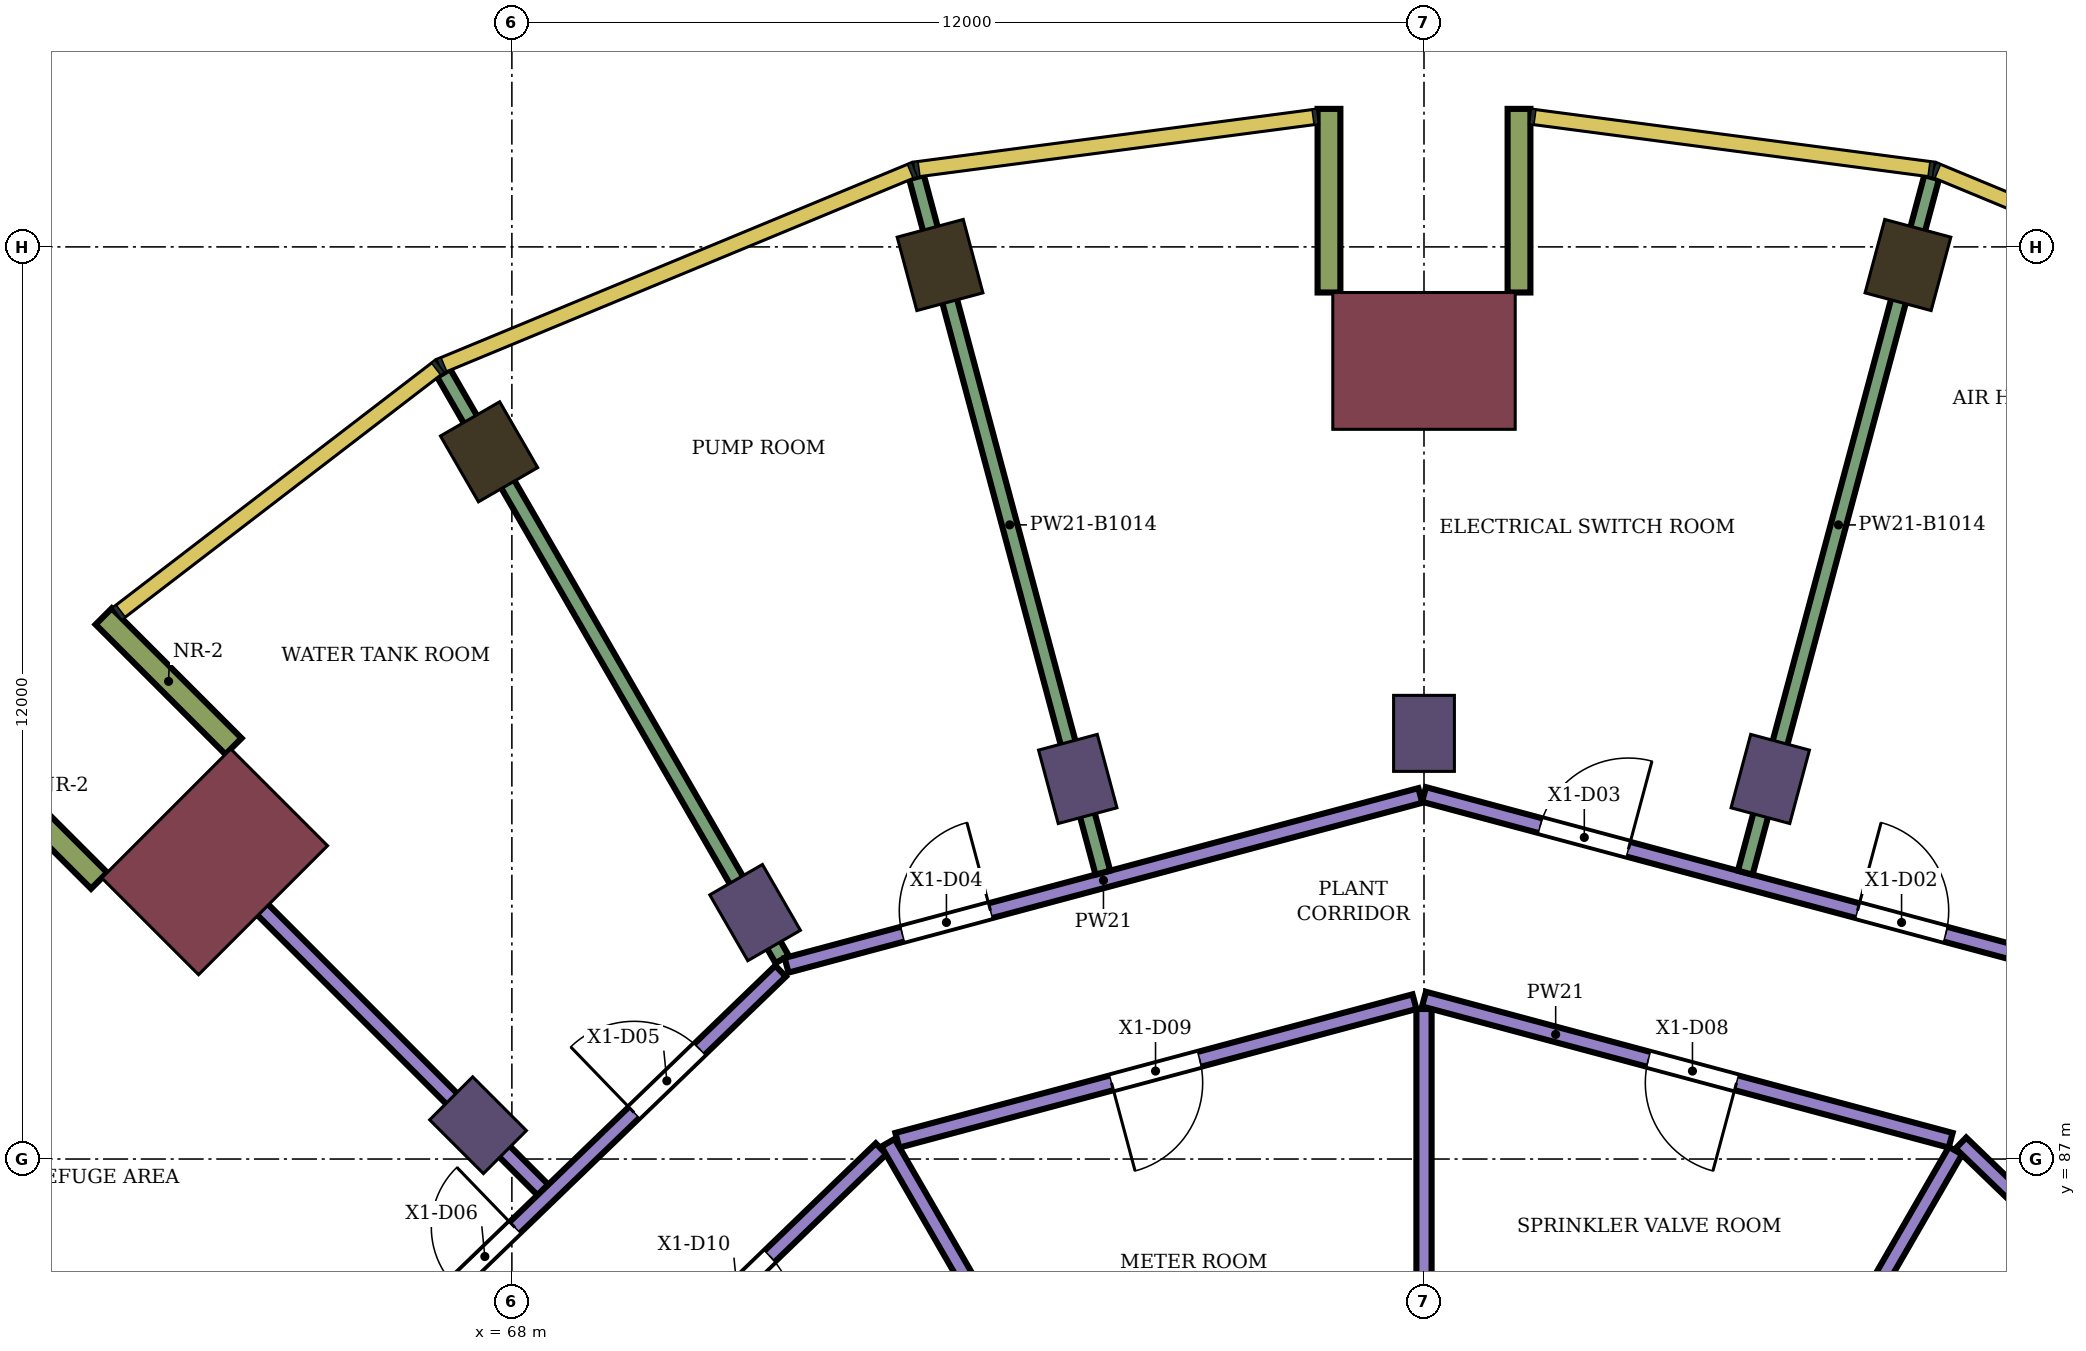
"""IFC4 building model, lengths in metres.
Left out: names, types, materials, properties, quantities, classifications, styles, units other than length and angle.
Written with IfcOpenShell. Run it as: python <this file> out.ifc"""

import sys

from ifc_helpers import new_model, si_unit, direction, frame, frame_2d, origin, origin_2d, place, context, subcontext, project, spatial, rectangle, extrude, element, fill, save


model = new_model("IFC4")
c1 = context("Model", 3, precision=1e-05, world=origin(), true_north=direction((0.0, 1.0)))
c2 = subcontext(c1, "Body", "Model", "MODEL_VIEW")
j1 = project(units=[si_unit("LENGTHUNIT", "METRE"), si_unit("PLANEANGLEUNIT", "RADIAN")], contexts=[c1])
p1 = place(None, origin())
s1 = spatial("IfcSite", under=j1, at=p1, CompositionType="ELEMENT")
p2 = place(p1, origin())
s2 = spatial("IfcBuilding", under=s1, at=p2, CompositionType="ELEMENT")
p3 = place(p2, frame((0.0, 0.0, 109.0)))
s3 = spatial("IfcBuildingStorey", under=s2, at=p3, CompositionType="ELEMENT", Elevation=109.0)
for number, where, z_axis, x_axis in (
    (1, (86.367, 98.762, 0.0), (0.0, 0.0, 1.0), (0.259, 0.966, 0.0)),
    (2, (73.633, 98.762, 0.0), (0.0, 0.0, 1.0), (-0.259, 0.966, 0.0)),
    (3, (67.7, 96.304, 0.0), (0.0, 0.0, 1.0), (-0.5, 0.866, 0.0)),
):
    element("IfcColumn", number, at=place(p3, frame(where, z_axis=z_axis, x_axis=x_axis)), inside=s3, PredefinedType="COLUMN", context=c2, shape_type="SweptSolid", body=[
        extrude(rectangle(XDim=1.0, YDim=0.9, at=origin_2d()), origin(), (0.0, 0.0, 1.0), 5.6),
    ])
for number, where, z_axis, x_axis in (
    (4, (84.555, 92.0, 0.0), (0.0, 0.0, 1.0), (0.259, 0.966, 0.0)),
    (5, (80.0, 92.6, 0.0), (0.0, 0.0, 1.0), (0.0, 1.0, 0.0)),
    (6, (75.445, 92.0, 0.0), (0.0, 0.0, 1.0), (-0.259, 0.966, 0.0)),
    (7, (71.2, 90.242, 0.0), (0.0, 0.0, 1.0), (-0.5, 0.866, 0.0)),
    (8, (67.555, 87.445, 0.0), (0.0, 0.0, 1.0), (-0.707, 0.707, 0.0)),
):
    element("IfcColumn", number, at=place(p3, frame(where, z_axis=z_axis, x_axis=x_axis)), inside=s3, PredefinedType="COLUMN", context=c2, shape_type="SweptSolid", body=[
        extrude(rectangle(XDim=1.0, YDim=0.8, at=origin_2d()), origin(), (0.0, 0.0, 1.0), 5.6),
    ])
for number, where, z_axis, x_axis in (
    (9, (80.0, 97.5, 0.0), (0.0, 0.0, 1.0), (0.0, 1.0, 0.0)),
    (10, (64.09, 90.91, 0.0), (0.0, 0.0, 1.0), (-0.707, 0.707, 0.0)),
):
    element("IfcColumn", number, at=place(p3, frame(where, z_axis=z_axis, x_axis=x_axis)), inside=s3, PredefinedType="COLUMN", context=c2, shape_type="SweptSolid", body=[
        extrude(rectangle(XDim=1.8, YDim=2.4, at=origin_2d()), origin(), (0.0, 0.0, 1.0), 5.6),
    ])
for number, where, z_axis, x_axis in (
    (11, (81.25, 98.4, 0.0), (0.0, 0.0, 1.0), (0.0, 1.0, 0.0)),
    (12, (78.75, 98.4, 0.0), (0.0, 0.0, 1.0), (0.0, 1.0, 0.0)),
    (13, (64.338, 92.43, 0.0), (0.0, 0.0, 1.0), (-0.707, 0.707, 0.0)),
    (14, (62.57, 90.662, 0.0), (0.0, 0.0, 1.0), (-0.707, 0.707, 0.0)),
):
    element("IfcWall", number, at=place(p3, frame(where, z_axis=z_axis, x_axis=x_axis)), inside=s3, PredefinedType="NOTDEFINED", context=c2, shape_type="SweptSolid", body=[
        extrude(rectangle(XDim=2.416, YDim=0.3, at=frame_2d((1.208, 0.0))), origin(), (0.0, 0.0, 1.0), 5.6),
    ])
p4 = place(p3, frame((63.597, 91.406, 0.0), z_axis=(0.0, 0.0, 1.0), x_axis=(0.707035026478, -0.707178528614, 0.0)))
e15 = element("IfcWall", 15, at=p4, inside=s3, PredefinedType="PARTITIONING", context=c2, shape_type="SweptSolid", body=[
    extrude(rectangle(XDim=6.805, YDim=0.2, at=frame_2d((3.403, 0.0))), origin(), (0.0, 0.0, 1.0), 5.15),
])
p5 = place(p3, frame((66.84, 84.941, 0.0), z_axis=(0.0, 0.0, 1.0), x_axis=(0.719566481028, 0.694423559062, 0.0)))
e16 = element("IfcWall", 16, at=p5, inside=s3, PredefinedType="PARTITIONING", context=c2, shape_type="SweptSolid", body=[
    extrude(rectangle(XDim=6.525, YDim=0.2, at=frame_2d((3.263, 0.0))), origin(), (0.0, 0.0, 1.0), 5.15),
])
p6 = place(p5, frame((3.846, 0.0, 0.0)))
e17 = element("IfcOpeningElement", 17, at=p6, cuts=e16, PredefinedType="OPENING", context=c2, shape_type="SweptSolid", body=[
    extrude(rectangle(XDim=1.2, YDim=2.4, at=frame_2d((0.6, 1.2))), frame((0.0, 0.11, 0.0), z_axis=(0.0, -1.0, 0.0), x_axis=(1.0, 0.0, 0.0)), (0.0, 0.0, 1.0), 0.22),
])
p7 = place(p5, frame((0.568, 0.0, 0.0)))
e18 = element("IfcOpeningElement", 18, at=p7, cuts=e16, PredefinedType="OPENING", context=c2, shape_type="SweptSolid", body=[
    extrude(rectangle(XDim=1.1, YDim=2.1, at=frame_2d((0.55, 1.05))), frame((0.0, 0.11, 0.0), z_axis=(0.0, -1.0, 0.0), x_axis=(1.0, 0.0, 0.0)), (0.0, 0.0, 1.0), 0.22),
])
p8 = place(p3, frame((67.102, 97.342, 0.0), z_axis=(0.0, 0.0, 1.0), x_axis=(0.499997660635, -0.866026754413, 0.0)))
e19 = element("IfcWall", 19, at=p8, inside=s3, PredefinedType="PARTITIONING", context=c2, shape_type="SweptSolid", body=[
    extrude(rectangle(XDim=8.908, YDim=0.2, at=frame_2d((4.454, 0.0))), origin(), (0.0, 0.0, 1.0), 4.586),
])
p9 = place(p3, frame((68.987, 83.4, 0.0), z_axis=(0.0, 0.0, 1.0), x_axis=(0.719547721855, 0.694442996922, 0.0)))
e20 = element("IfcWall", 20, at=p9, inside=s3, PredefinedType="PARTITIONING", context=c2, shape_type="SweptSolid", body=[
    extrude(rectangle(XDim=5.378, YDim=0.2, at=frame_2d((2.689, 0.0))), origin(), (0.0, 0.0, 1.0), 5.15),
])
p10 = place(p9, frame((2.144, 0.0, 0.0)))
e21 = element("IfcOpeningElement", 21, at=p10, cuts=e20, PredefinedType="OPENING", context=c2, shape_type="SweptSolid", body=[
    extrude(rectangle(XDim=1.2, YDim=2.4, at=frame_2d((0.6, 1.2))), frame((0.0, 0.11, 0.0), z_axis=(0.0, -1.0, 0.0), x_axis=(1.0, 0.0, 0.0)), (0.0, 0.0, 1.0), 0.22),
])
p11 = place(p3, frame((71.614, 89.549, 0.0), z_axis=(0.0, 0.0, 1.0), x_axis=(0.965931008246, 0.258799705, 0.0)))
e22 = element("IfcWall", 22, at=p11, inside=s3, PredefinedType="PARTITIONING", context=c2, shape_type="SweptSolid", body=[
    extrude(rectangle(XDim=8.632, YDim=0.2, at=frame_2d((4.316, 0.0))), origin(), (0.0, 0.0, 1.0), 5.15),
])
p12 = place(p11, frame((1.577, 0.0, 0.0)))
e23 = element("IfcOpeningElement", 23, at=p12, cuts=e22, PredefinedType="OPENING", context=c2, shape_type="SweptSolid", body=[
    extrude(rectangle(XDim=1.2, YDim=2.4, at=frame_2d((0.6, 1.2))), frame((0.0, 0.11, 0.0), z_axis=(0.0, -1.0, 0.0), x_axis=(1.0, 0.0, 0.0)), (0.0, 0.0, 1.0), 0.22),
])
p13 = place(p3, frame((73.071, 87.247, 0.0), z_axis=(0.0, 0.0, 1.0), x_axis=(0.965914318977, 0.258861987157, 0.0)))
e24 = element("IfcWall", 24, at=p13, inside=s3, PredefinedType="PARTITIONING", context=c2, shape_type="SweptSolid", body=[
    extrude(rectangle(XDim=7.043, YDim=0.2, at=frame_2d((3.521, 0.0))), origin(), (0.0, 0.0, 1.0), 5.15),
])
p14 = place(p13, frame((2.917, 0.0, 0.0)))
e25 = element("IfcOpeningElement", 25, at=p14, cuts=e24, PredefinedType="OPENING", context=c2, shape_type="SweptSolid", body=[
    extrude(rectangle(XDim=1.2, YDim=2.4, at=frame_2d((0.6, 1.2))), frame((0.0, 0.11, 0.0), z_axis=(0.0, -1.0, 0.0), x_axis=(1.0, 0.0, 0.0)), (0.0, 0.0, 1.0), 0.22),
])
p15 = place(p3, frame((72.948, 87.214, 0.0), z_axis=(0.0, 0.0, 1.0), x_axis=(0.500000701339, -0.866024998866, 0.0)))
e26 = element("IfcWall", 26, at=p15, inside=s3, PredefinedType="PARTITIONING", context=c2, shape_type="SweptSolid", body=[
    extrude(rectangle(XDim=6.405, YDim=0.2, at=frame_2d((3.203, 0.0))), origin(), (0.0, 0.0, 1.0), 5.15),
])
p16 = place(p3, frame((73.323, 99.918, 0.0), z_axis=(0.0, 0.0, 1.0), x_axis=(0.258818956582, -0.965925850008, 0.0)))
e27 = element("IfcWall", 27, at=p16, inside=s3, PredefinedType="PARTITIONING", context=c2, shape_type="SweptSolid", body=[
    extrude(rectangle(XDim=9.473, YDim=0.2, at=frame_2d((4.737, 0.0))), origin(), (0.0, 0.0, 1.0), 4.586),
])
p17 = place(p3, frame((80.0, 82.699, 0.0), z_axis=(0.0, 0.0, 1.0), x_axis=(0.0, 1.0, 0.0)))
e28 = element("IfcWall", 28, at=p17, inside=s3, PredefinedType="PARTITIONING", context=c2, shape_type="SweptSolid", body=[
    extrude(rectangle(XDim=6.275, YDim=0.2, at=frame_2d((3.138, 0.0))), origin(), (0.0, 0.0, 1.0), 5.15),
])
p18 = place(p3, frame((80.0, 89.104, 0.0), z_axis=(0.0, 0.0, 1.0), x_axis=(0.965912194639, -0.258869913757, 0.0)))
e29 = element("IfcWall", 29, at=p18, inside=s3, PredefinedType="PARTITIONING", context=c2, shape_type="SweptSolid", body=[
    extrude(rectangle(XDim=7.173, YDim=0.2, at=frame_2d((3.587, 0.0))), origin(), (0.0, 0.0, 1.0), 5.15),
])
p19 = place(p18, frame((3.057, 0.0, 0.0)))
e30 = element("IfcOpeningElement", 30, at=p19, cuts=e29, PredefinedType="OPENING", context=c2, shape_type="SweptSolid", body=[
    extrude(rectangle(XDim=1.2, YDim=2.4, at=frame_2d((0.6, 1.2))), frame((0.0, 0.11, 0.0), z_axis=(0.0, -1.0, 0.0), x_axis=(1.0, 0.0, 0.0)), (0.0, 0.0, 1.0), 0.22),
])
p20 = place(p3, frame((80.0, 91.796, 0.0), z_axis=(0.0, 0.0, 1.0), x_axis=(0.965917643923, -0.258849580177, 0.0)))
e31 = element("IfcWall", 31, at=p20, inside=s3, PredefinedType="PARTITIONING", context=c2, shape_type="SweptSolid", body=[
    extrude(rectangle(XDim=8.602, YDim=0.2, at=frame_2d((4.301, 0.0))), origin(), (0.0, 0.0, 1.0), 5.15),
])
p21 = place(p20, frame((5.905, 0.0, 0.0)))
e32 = element("IfcOpeningElement", 32, at=p21, cuts=e31, PredefinedType="OPENING", context=c2, shape_type="SweptSolid", body=[
    extrude(rectangle(XDim=1.2, YDim=2.4, at=frame_2d((0.6, 1.2))), frame((0.0, 0.11, 0.0), z_axis=(0.0, -1.0, 0.0), x_axis=(1.0, 0.0, 0.0)), (0.0, 0.0, 1.0), 0.22),
])
p22 = place(p20, frame((1.583, 0.0, 0.0)))
e33 = element("IfcOpeningElement", 33, at=p22, cuts=e31, PredefinedType="OPENING", context=c2, shape_type="SweptSolid", body=[
    extrude(rectangle(XDim=1.2, YDim=2.4, at=frame_2d((0.6, 1.2))), frame((0.0, 0.11, 0.0), z_axis=(0.0, -1.0, 0.0), x_axis=(1.0, 0.0, 0.0)), (0.0, 0.0, 1.0), 0.22),
])
p23 = place(p3, frame((83.849, 81.667, 0.0), z_axis=(0.0, 0.0, 1.0), x_axis=(0.500074377092, 0.865982457891, 0.0)))
e34 = element("IfcWall", 34, at=p23, inside=s3, PredefinedType="PARTITIONING", context=c2, shape_type="SweptSolid", body=[
    extrude(rectangle(XDim=6.285, YDim=0.2, at=frame_2d((3.143, 0.0))), origin(), (0.0, 0.0, 1.0), 5.15),
])
p24 = place(p3, frame((84.226, 90.767, 0.0), z_axis=(0.0, 0.0, 1.0), x_axis=(0.258915131717, 0.965900074836, 0.0)))
e35 = element("IfcWall", 35, at=p24, inside=s3, PredefinedType="PARTITIONING", context=c2, shape_type="SweptSolid", body=[
    extrude(rectangle(XDim=9.474, YDim=0.2, at=frame_2d((4.737, 0.0))), origin(), (0.0, 0.0, 1.0), 4.586),
])
p25 = place(p3, frame((87.064, 87.211, 0.0), z_axis=(0.0, 0.0, 1.0), x_axis=(0.719562412484, -0.694427774891, 0.0)))
e36 = element("IfcWall", 36, at=p25, inside=s3, PredefinedType="PARTITIONING", context=c2, shape_type="SweptSolid", body=[
    extrude(rectangle(XDim=5.488, YDim=0.2, at=frame_2d((2.744, 0.0))), origin(), (0.0, 0.0, 1.0), 5.15),
])
p26 = place(p25, frame((2.144, 0.0, 0.0)))
e37 = element("IfcOpeningElement", 37, at=p26, cuts=e36, PredefinedType="OPENING", context=c2, shape_type="SweptSolid", body=[
    extrude(rectangle(XDim=1.2, YDim=2.4, at=frame_2d((0.6, 1.2))), frame((0.0, 0.11, 0.0), z_axis=(0.0, -1.0, 0.0), x_axis=(1.0, 0.0, 0.0)), (0.0, 0.0, 1.0), 0.22),
])
p27 = place(p21, origin())
e38 = element("IfcDoor", 38, at=p27, inside=s3, OperationType="SINGLE_SWING_LEFT", PredefinedType="DOOR", context=c2, shape_type="SweptSolid", body=[
    extrude(rectangle(XDim=1.2, YDim=2.4, at=frame_2d((0.6, 1.2))), frame((0.0, 0.025, 0.0), z_axis=(0.0, -1.0, 0.0), x_axis=(1.0, 0.0, 0.0)), (0.0, 0.0, 1.0), 0.05),
])
fill(e32, e38)
p28 = place(p22, origin())
e39 = element("IfcDoor", 39, at=p28, inside=s3, OperationType="SINGLE_SWING_RIGHT", PredefinedType="DOOR", context=c2, shape_type="SweptSolid", body=[
    extrude(rectangle(XDim=1.2, YDim=2.4, at=frame_2d((0.6, 1.2))), frame((0.0, 0.025, 0.0), z_axis=(0.0, -1.0, 0.0), x_axis=(1.0, 0.0, 0.0)), (0.0, 0.0, 1.0), 0.05),
])
fill(e33, e39)
p29 = place(p12, origin())
e40 = element("IfcDoor", 40, at=p29, inside=s3, OperationType="SINGLE_SWING_RIGHT", PredefinedType="DOOR", context=c2, shape_type="SweptSolid", body=[
    extrude(rectangle(XDim=1.2, YDim=2.4, at=frame_2d((0.6, 1.2))), frame((0.0, 0.025, 0.0), z_axis=(0.0, -1.0, 0.0), x_axis=(1.0, 0.0, 0.0)), (0.0, 0.0, 1.0), 0.05),
])
fill(e23, e40)
p30 = place(p6, origin())
e41 = element("IfcDoor", 41, at=p30, inside=s3, OperationType="SINGLE_SWING_LEFT", PredefinedType="DOOR", context=c2, shape_type="SweptSolid", body=[
    extrude(rectangle(XDim=1.2, YDim=2.4, at=frame_2d((0.6, 1.2))), frame((0.0, 0.025, 0.0), z_axis=(0.0, -1.0, 0.0), x_axis=(1.0, 0.0, 0.0)), (0.0, 0.0, 1.0), 0.05),
])
fill(e17, e41)
p31 = place(p7, origin())
e42 = element("IfcDoor", 42, at=p31, inside=s3, OperationType="SINGLE_SWING_RIGHT", PredefinedType="DOOR", context=c2, shape_type="SweptSolid", body=[
    extrude(rectangle(XDim=1.1, YDim=2.1, at=frame_2d((0.55, 1.05))), frame((0.0, 0.025, 0.0), z_axis=(0.0, -1.0, 0.0), x_axis=(1.0, 0.0, 0.0)), (0.0, 0.0, 1.0), 0.05),
])
fill(e18, e42)
p32 = place(p19, frame((1.2, 0.0, 0.0), z_axis=(0.0, 0.0, 1.0), x_axis=(-1.0, 0.0, 0.0)))
e43 = element("IfcDoor", 43, at=p32, inside=s3, OperationType="SINGLE_SWING_LEFT", PredefinedType="DOOR", context=c2, shape_type="SweptSolid", body=[
    extrude(rectangle(XDim=1.2, YDim=2.4, at=frame_2d((0.6, 1.2))), frame((0.0, 0.025, 0.0), z_axis=(0.0, -1.0, 0.0), x_axis=(1.0, 0.0, 0.0)), (0.0, 0.0, 1.0), 0.05),
])
fill(e30, e43)
p33 = place(p14, frame((1.2, 0.0, 0.0), z_axis=(0.0, 0.0, 1.0), x_axis=(-1.0, 0.0, 0.0)))
e44 = element("IfcDoor", 44, at=p33, inside=s3, OperationType="SINGLE_SWING_RIGHT", PredefinedType="DOOR", context=c2, shape_type="SweptSolid", body=[
    extrude(rectangle(XDim=1.2, YDim=2.4, at=frame_2d((0.6, 1.2))), frame((0.0, 0.025, 0.0), z_axis=(0.0, -1.0, 0.0), x_axis=(1.0, 0.0, 0.0)), (0.0, 0.0, 1.0), 0.05),
])
fill(e25, e44)
p34 = place(p10, frame((1.2, 0.0, 0.0), z_axis=(0.0, 0.0, 1.0), x_axis=(-1.0, 0.0, 0.0)))
e45 = element("IfcDoor", 45, at=p34, inside=s3, OperationType="SINGLE_SWING_RIGHT", PredefinedType="DOOR", context=c2, shape_type="SweptSolid", body=[
    extrude(rectangle(XDim=1.2, YDim=2.4, at=frame_2d((0.6, 1.2))), frame((0.0, 0.025, 0.0), z_axis=(0.0, -1.0, 0.0), x_axis=(1.0, 0.0, 0.0)), (0.0, 0.0, 1.0), 0.05),
])
fill(e21, e45)
save(model, sys.argv[1])
